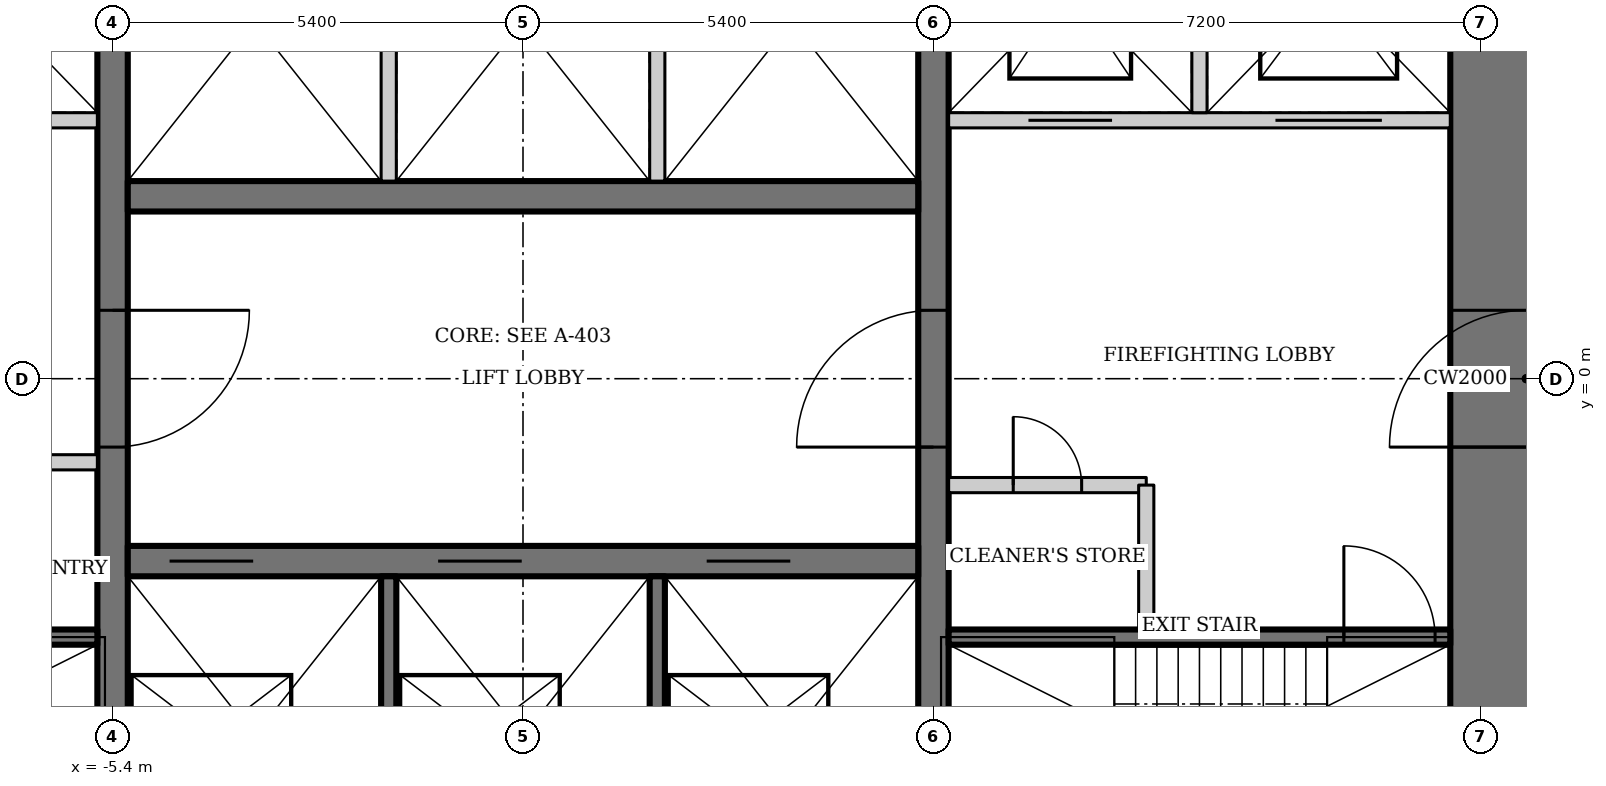
"""IFC4 building model, lengths in metres.
Left out: names, types, materials, properties, quantities, classifications, styles, units other than length and angle.
Written with IfcOpenShell. Run it as: python <this file> out.ifc"""

import sys

from ifc_helpers import new_model, si_unit, direction, frame, frame_2d, origin, place, context, subcontext, project, spatial, rectangle, extrude, element, fill, save


model = new_model("IFC4")
c1 = context("Model", 3, precision=1e-05, world=origin(), true_north=direction((0.0, 1.0)))
c2 = subcontext(c1, "Body", "Model", "MODEL_VIEW")
j1 = project(units=[si_unit("LENGTHUNIT", "METRE"), si_unit("PLANEANGLEUNIT", "RADIAN")], contexts=[c1])
p1 = place(None, origin())
s1 = spatial("IfcSite", under=j1, at=p1, CompositionType="ELEMENT")
p2 = place(p1, origin())
s2 = spatial("IfcBuilding", under=s1, at=p2, CompositionType="ELEMENT")
p3 = place(p2, frame((0.0, 0.0, 83.8)))
s3 = spatial("IfcBuildingStorey", under=s2, at=p3, CompositionType="ELEMENT", Elevation=83.8)
p4 = place(p3, frame((13.2, -13.0, 0.0), z_axis=(0.0, 0.0, 1.0), x_axis=(0.0, 1.0, 0.0)))
e1 = element("IfcWall", 1, at=p4, inside=s3, PredefinedType="SHEAR", context=c2, shape_type="SweptSolid", body=[
    extrude(rectangle(XDim=26.0, YDim=2.0, at=frame_2d((13.0, 0.0))), origin(), (0.0, 0.0, 1.0), 3.6),
])
p5 = place(p4, frame((12.1, 0.0, 0.0)))
e2 = element("IfcOpeningElement", 2, at=p5, cuts=e1, PredefinedType="OPENING", context=c2, shape_type="SweptSolid", body=[
    extrude(rectangle(XDim=1.8, YDim=2.1, at=frame_2d((0.9, 1.05))), frame((0.0, 1.01, 0.0), z_axis=(0.0, -1.0, 0.0), x_axis=(1.0, 0.0, 0.0)), (0.0, 0.0, 1.0), 2.02),
])
p6 = place(p3, frame((5.4, -6.8, 0.0), z_axis=(0.0, 0.0, 1.0), x_axis=(0.0, 1.0, 0.0)))
e3 = element("IfcWall", 3, at=p6, inside=s3, PredefinedType="SHEAR", context=c2, shape_type="SweptSolid", body=[
    extrude(rectangle(XDim=13.6, YDim=0.4, at=frame_2d((6.8, 0.0))), origin(), (0.0, 0.0, 1.0), 3.6),
])
p7 = place(p6, frame((5.9, 0.0, 0.0)))
e4 = element("IfcOpeningElement", 4, at=p7, cuts=e3, PredefinedType="OPENING", context=c2, shape_type="SweptSolid", body=[
    extrude(rectangle(XDim=1.8, YDim=2.1, at=frame_2d((0.9, 1.05))), frame((0.0, 0.21, 0.0), z_axis=(0.0, -1.0, 0.0), x_axis=(1.0, 0.0, 0.0)), (0.0, 0.0, 1.0), 0.42),
])
p8 = place(p3, frame((-5.4, 6.8, 0.0), z_axis=(0.0, 0.0, 1.0), x_axis=(0.0, -1.0, 0.0)))
e5 = element("IfcWall", 5, at=p8, inside=s3, PredefinedType="SHEAR", context=c2, shape_type="SweptSolid", body=[
    extrude(rectangle(XDim=13.6, YDim=0.4, at=frame_2d((6.8, 0.0))), origin(), (0.0, 0.0, 1.0), 3.6),
])
p9 = place(p8, frame((5.9, 0.0, 0.0)))
e6 = element("IfcOpeningElement", 6, at=p9, cuts=e5, PredefinedType="OPENING", context=c2, shape_type="SweptSolid", body=[
    extrude(rectangle(XDim=1.8, YDim=2.1, at=frame_2d((0.9, 1.05))), frame((0.0, 0.21, 0.0), z_axis=(0.0, -1.0, 0.0), x_axis=(1.0, 0.0, 0.0)), (0.0, 0.0, 1.0), 0.42),
])
p10 = place(p3, frame((-5.2, -2.4, 0.0), z_axis=(0.0, 0.0, 1.0), x_axis=(1.0, 0.0, 0.0)))
e7 = element("IfcWall", 7, at=p10, inside=s3, PredefinedType="SHEAR", context=c2, shape_type="SweptSolid", body=[
    extrude(rectangle(XDim=10.4, YDim=0.4, at=frame_2d((5.2, 0.0))), origin(), (0.0, 0.0, 1.0), 3.6),
])
p11 = place(p10, frame((0.55, 0.0, 0.0)))
e8 = element("IfcOpeningElement", 8, at=p11, cuts=e7, PredefinedType="OPENING", context=c2, shape_type="SweptSolid", body=[
    extrude(rectangle(XDim=1.1, YDim=2.2, at=frame_2d((0.55, 1.1))), frame((0.0, 0.21, 0.0), z_axis=(0.0, -1.0, 0.0), x_axis=(1.0, 0.0, 0.0)), (0.0, 0.0, 1.0), 0.42),
])
p12 = place(p10, frame((4.083, 0.0, 0.0)))
e9 = element("IfcOpeningElement", 9, at=p12, cuts=e7, PredefinedType="OPENING", context=c2, shape_type="SweptSolid", body=[
    extrude(rectangle(XDim=1.1, YDim=2.2, at=frame_2d((0.55, 1.1))), frame((0.0, 0.21, 0.0), z_axis=(0.0, -1.0, 0.0), x_axis=(1.0, 0.0, 0.0)), (0.0, 0.0, 1.0), 0.42),
])
p13 = place(p10, frame((7.617, 0.0, 0.0)))
e10 = element("IfcOpeningElement", 10, at=p13, cuts=e7, PredefinedType="OPENING", context=c2, shape_type="SweptSolid", body=[
    extrude(rectangle(XDim=1.1, YDim=2.2, at=frame_2d((0.55, 1.1))), frame((0.0, 0.21, 0.0), z_axis=(0.0, -1.0, 0.0), x_axis=(1.0, 0.0, 0.0)), (0.0, 0.0, 1.0), 0.42),
])
for number, where, z_axis, x_axis in (
    (11, (-1.767, -2.6, 0.0), (0.0, 0.0, 1.0), (0.0, -1.0, 0.0)),
    (12, (1.767, -2.6, 0.0), (0.0, 0.0, 1.0), (0.0, -1.0, 0.0)),
):
    element("IfcWall", number, at=place(p3, frame(where, z_axis=z_axis, x_axis=x_axis)), inside=s3, PredefinedType="SOLIDWALL", context=c2, shape_type="SweptSolid", body=[
        extrude(rectangle(XDim=4.2, YDim=0.2, at=frame_2d((2.1, 0.0))), origin(), (0.0, 0.0, 1.0), 3.6),
    ])
p14 = place(p3, frame((5.2, 2.4, 0.0), z_axis=(0.0, 0.0, 1.0), x_axis=(-1.0, 0.0, 0.0)))
e13 = element("IfcWall", 13, at=p14, inside=s3, PredefinedType="SHEAR", context=c2, shape_type="SweptSolid", body=[
    extrude(rectangle(XDim=10.4, YDim=0.4, at=frame_2d((5.2, 0.0))), origin(), (0.0, 0.0, 1.0), 3.6),
])
for number, where, z_axis, x_axis in (
    (14, (-1.767, 2.6, 0.0), (0.0, 0.0, 1.0), (0.0, 1.0, 0.0)),
    (15, (1.767, 2.6, 0.0), (0.0, 0.0, 1.0), (0.0, 1.0, 0.0)),
):
    element("IfcWall", number, at=place(p3, frame(where, z_axis=z_axis, x_axis=x_axis)), inside=s3, PredefinedType="SOLIDWALL", context=c2, shape_type="SweptSolid", body=[
        extrude(rectangle(XDim=4.2, YDim=0.2, at=frame_2d((2.1, 0.0))), origin(), (0.0, 0.0, 1.0), 3.6),
    ])
p15 = place(p3, frame((5.6, -3.4, 0.0), z_axis=(0.0, 0.0, 1.0), x_axis=(1.0, 0.0, 0.0)))
e16 = element("IfcWall", 16, at=p15, inside=s3, PredefinedType="SHEAR", context=c2, shape_type="SweptSolid", body=[
    extrude(rectangle(XDim=6.6, YDim=0.2, at=frame_2d((3.3, 0.0))), origin(), (0.0, 0.0, 1.0), 3.6),
])
p16 = place(p15, frame((5.2, 0.0, 0.0)))
e17 = element("IfcOpeningElement", 17, at=p16, cuts=e16, PredefinedType="OPENING", context=c2, shape_type="SweptSolid", body=[
    extrude(rectangle(XDim=1.2, YDim=2.1, at=frame_2d((0.6, 1.05))), frame((0.0, 0.11, 0.0), z_axis=(0.0, -1.0, 0.0), x_axis=(1.0, 0.0, 0.0)), (0.0, 0.0, 1.0), 0.22),
])
p17 = place(p3, frame((12.2, 3.4, 0.0), z_axis=(0.0, 0.0, 1.0), x_axis=(-1.0, 0.0, 0.0)))
e18 = element("IfcWall", 18, at=p17, inside=s3, PredefinedType="SOLIDWALL", context=c2, shape_type="SweptSolid", body=[
    extrude(rectangle(XDim=6.6, YDim=0.2, at=frame_2d((3.3, 0.0))), origin(), (0.0, 0.0, 1.0), 3.6),
])
p18 = place(p17, frame((4.45, 0.0, 0.0)))
e19 = element("IfcOpeningElement", 19, at=p18, cuts=e18, PredefinedType="OPENING", context=c2, shape_type="SweptSolid", body=[
    extrude(rectangle(XDim=1.1, YDim=2.2, at=frame_2d((0.55, 1.1))), frame((0.0, 0.11, 0.0), z_axis=(0.0, -1.0, 0.0), x_axis=(1.0, 0.0, 0.0)), (0.0, 0.0, 1.0), 0.22),
])
p19 = place(p17, frame((0.9, 0.0, 0.0)))
e20 = element("IfcOpeningElement", 20, at=p19, cuts=e18, PredefinedType="OPENING", context=c2, shape_type="SweptSolid", body=[
    extrude(rectangle(XDim=1.4, YDim=2.2, at=frame_2d((0.7, 1.1))), frame((0.0, 0.11, 0.0), z_axis=(0.0, -1.0, 0.0), x_axis=(1.0, 0.0, 0.0)), (0.0, 0.0, 1.0), 0.22),
])
p20 = place(p3, frame((8.9, 3.5, 0.0), z_axis=(0.0, 0.0, 1.0), x_axis=(0.0, 1.0, 0.0)))
e21 = element("IfcWall", 21, at=p20, inside=s3, PredefinedType="SOLIDWALL", context=c2, shape_type="SweptSolid", body=[
    extrude(rectangle(XDim=3.3, YDim=0.2, at=frame_2d((1.65, 0.0))), origin(), (0.0, 0.0, 1.0), 3.6),
])
p21 = place(p3, frame((-5.6, -3.4, 0.0), z_axis=(0.0, 0.0, 1.0), x_axis=(-1.0, 0.0, 0.0)))
e22 = element("IfcWall", 22, at=p21, inside=s3, PredefinedType="SHEAR", context=c2, shape_type="SweptSolid", body=[
    extrude(rectangle(XDim=6.6, YDim=0.2, at=frame_2d((3.3, 0.0))), origin(), (0.0, 0.0, 1.0), 3.6),
])
p22 = place(p21, frame((5.2, 0.0, 0.0)))
e23 = element("IfcOpeningElement", 23, at=p22, cuts=e22, PredefinedType="OPENING", context=c2, shape_type="SweptSolid", body=[
    extrude(rectangle(XDim=1.2, YDim=2.1, at=frame_2d((0.6, 1.05))), frame((0.0, 0.11, 0.0), z_axis=(0.0, -1.0, 0.0), x_axis=(1.0, 0.0, 0.0)), (0.0, 0.0, 1.0), 0.22),
])
p23 = place(p3, frame((-12.2, 3.4, 0.0), z_axis=(0.0, 0.0, 1.0), x_axis=(1.0, 0.0, 0.0)))
e24 = element("IfcWall", 24, at=p23, inside=s3, PredefinedType="SOLIDWALL", context=c2, shape_type="SweptSolid", body=[
    extrude(rectangle(XDim=6.6, YDim=0.2, at=frame_2d((3.3, 0.0))), origin(), (0.0, 0.0, 1.0), 3.6),
])
p24 = place(p23, frame((1.05, 0.0, 0.0)))
e25 = element("IfcOpeningElement", 25, at=p24, cuts=e24, PredefinedType="OPENING", context=c2, shape_type="SweptSolid", body=[
    extrude(rectangle(XDim=1.1, YDim=2.2, at=frame_2d((0.55, 1.1))), frame((0.0, 0.11, 0.0), z_axis=(0.0, -1.0, 0.0), x_axis=(1.0, 0.0, 0.0)), (0.0, 0.0, 1.0), 0.22),
])
p25 = place(p23, frame((4.3, 0.0, 0.0)))
e26 = element("IfcOpeningElement", 26, at=p25, cuts=e24, PredefinedType="OPENING", context=c2, shape_type="SweptSolid", body=[
    extrude(rectangle(XDim=1.4, YDim=2.2, at=frame_2d((0.7, 1.1))), frame((0.0, 0.11, 0.0), z_axis=(0.0, -1.0, 0.0), x_axis=(1.0, 0.0, 0.0)), (0.0, 0.0, 1.0), 0.22),
])
p26 = place(p3, frame((-5.6, -1.1, 0.0), z_axis=(0.0, 0.0, 1.0), x_axis=(-1.0, 0.0, 0.0)))
e27 = element("IfcWall", 27, at=p26, inside=s3, PredefinedType="SOLIDWALL", context=c2, shape_type="SweptSolid", body=[
    extrude(rectangle(XDim=2.4, YDim=0.2, at=frame_2d((1.2, 0.0))), origin(), (0.0, 0.0, 1.0), 3.45),
])
p27 = place(p26, frame((0.75, 0.0, 0.0)))
e28 = element("IfcOpeningElement", 28, at=p27, cuts=e27, PredefinedType="OPENING", context=c2, shape_type="SweptSolid", body=[
    extrude(rectangle(XDim=0.9, YDim=2.1, at=frame_2d((0.45, 1.05))), frame((0.0, 0.11, 0.0), z_axis=(0.0, -1.0, 0.0), x_axis=(1.0, 0.0, 0.0)), (0.0, 0.0, 1.0), 0.22),
])
p28 = place(p3, frame((5.6, -1.4, 0.0), z_axis=(0.0, 0.0, 1.0), x_axis=(1.0, 0.0, 0.0)))
e29 = element("IfcWall", 29, at=p28, inside=s3, PredefinedType="SOLIDWALL", context=c2, shape_type="SweptSolid", body=[
    extrude(rectangle(XDim=2.6, YDim=0.2, at=frame_2d((1.3, 0.0))), origin(), (0.0, 0.0, 1.0), 3.45),
])
p29 = place(p28, frame((0.85, 0.0, 0.0)))
e30 = element("IfcOpeningElement", 30, at=p29, cuts=e29, PredefinedType="OPENING", context=c2, shape_type="SweptSolid", body=[
    extrude(rectangle(XDim=0.9, YDim=2.1, at=frame_2d((0.45, 1.05))), frame((0.0, 0.11, 0.0), z_axis=(0.0, -1.0, 0.0), x_axis=(1.0, 0.0, 0.0)), (0.0, 0.0, 1.0), 0.22),
])
p30 = place(p3, frame((8.2, -1.4, 0.0), z_axis=(0.0, 0.0, 1.0), x_axis=(0.0, -1.0, 0.0)))
e31 = element("IfcWall", 31, at=p30, inside=s3, PredefinedType="SOLIDWALL", context=c2, shape_type="SweptSolid", body=[
    extrude(rectangle(XDim=1.9, YDim=0.2, at=frame_2d((0.95, 0.0))), origin(), (0.0, 0.0, 1.0), 3.45),
])
p31 = place(p29, origin())
e32 = element("IfcDoor", 32, at=p31, inside=s3, OperationType="SINGLE_SWING_LEFT", PredefinedType="DOOR", context=c2, shape_type="SweptSolid", body=[
    extrude(rectangle(XDim=0.9, YDim=2.1, at=frame_2d((0.45, 1.05))), frame((0.0, 0.025, 0.0), z_axis=(0.0, -1.0, 0.0), x_axis=(1.0, 0.0, 0.0)), (0.0, 0.0, 1.0), 0.05),
])
fill(e30, e32)
p32 = place(p7, origin())
e33 = element("IfcDoor", 33, at=p32, inside=s3, OperationType="DOUBLE_DOOR_DOUBLE_SWING", PredefinedType="DOOR", context=c2, shape_type="SweptSolid", body=[
    extrude(rectangle(XDim=1.8, YDim=2.1, at=frame_2d((0.9, 1.05))), frame((0.0, 0.025, 0.0), z_axis=(0.0, -1.0, 0.0), x_axis=(1.0, 0.0, 0.0)), (0.0, 0.0, 1.0), 0.05),
])
fill(e4, e33)
p33 = place(p9, origin())
e34 = element("IfcDoor", 34, at=p33, inside=s3, OperationType="DOUBLE_DOOR_DOUBLE_SWING", PredefinedType="DOOR", context=c2, shape_type="SweptSolid", body=[
    extrude(rectangle(XDim=1.8, YDim=2.1, at=frame_2d((0.9, 1.05))), frame((0.0, 0.025, 0.0), z_axis=(0.0, -1.0, 0.0), x_axis=(1.0, 0.0, 0.0)), (0.0, 0.0, 1.0), 0.05),
])
fill(e6, e34)
p34 = place(p16, origin())
e35 = element("IfcDoor", 35, at=p34, inside=s3, OperationType="SINGLE_SWING_RIGHT", PredefinedType="DOOR", context=c2, shape_type="SweptSolid", body=[
    extrude(rectangle(XDim=1.2, YDim=2.1, at=frame_2d((0.6, 1.05))), frame((0.0, 0.025, 0.0), z_axis=(0.0, -1.0, 0.0), x_axis=(1.0, 0.0, 0.0)), (0.0, 0.0, 1.0), 0.05),
])
fill(e17, e35)
p35 = place(p5, origin())
e36 = element("IfcDoor", 36, at=p35, inside=s3, OperationType="DOUBLE_DOOR_DOUBLE_SWING", PredefinedType="DOOR", context=c2, shape_type="SweptSolid", body=[
    extrude(rectangle(XDim=1.8, YDim=2.1, at=frame_2d((0.9, 1.05))), frame((0.0, 0.025, 0.0), z_axis=(0.0, -1.0, 0.0), x_axis=(1.0, 0.0, 0.0)), (0.0, 0.0, 1.0), 0.05),
])
fill(e2, e36)
p36 = place(p11, origin())
e37 = element("IfcDoor", 37, at=p36, inside=s3, OperationType="DOUBLE_DOOR_SLIDING", PredefinedType="DOOR", context=c2, shape_type="SweptSolid", body=[
    extrude(rectangle(XDim=1.1, YDim=2.2, at=frame_2d((0.55, 1.1))), frame((0.0, 0.025, 0.0), z_axis=(0.0, -1.0, 0.0), x_axis=(1.0, 0.0, 0.0)), (0.0, 0.0, 1.0), 0.05),
])
fill(e8, e37)
p37 = place(p12, origin())
e38 = element("IfcDoor", 38, at=p37, inside=s3, OperationType="DOUBLE_DOOR_SLIDING", PredefinedType="DOOR", context=c2, shape_type="SweptSolid", body=[
    extrude(rectangle(XDim=1.1, YDim=2.2, at=frame_2d((0.55, 1.1))), frame((0.0, 0.025, 0.0), z_axis=(0.0, -1.0, 0.0), x_axis=(1.0, 0.0, 0.0)), (0.0, 0.0, 1.0), 0.05),
])
fill(e9, e38)
p38 = place(p13, origin())
e39 = element("IfcDoor", 39, at=p38, inside=s3, OperationType="DOUBLE_DOOR_SLIDING", PredefinedType="DOOR", context=c2, shape_type="SweptSolid", body=[
    extrude(rectangle(XDim=1.1, YDim=2.2, at=frame_2d((0.55, 1.1))), frame((0.0, 0.025, 0.0), z_axis=(0.0, -1.0, 0.0), x_axis=(1.0, 0.0, 0.0)), (0.0, 0.0, 1.0), 0.05),
])
fill(e10, e39)
p39 = place(p18, origin())
e40 = element("IfcDoor", 40, at=p39, inside=s3, OperationType="DOUBLE_DOOR_SLIDING", PredefinedType="DOOR", context=c2, shape_type="SweptSolid", body=[
    extrude(rectangle(XDim=1.1, YDim=2.2, at=frame_2d((0.55, 1.1))), frame((0.0, 0.025, 0.0), z_axis=(0.0, -1.0, 0.0), x_axis=(1.0, 0.0, 0.0)), (0.0, 0.0, 1.0), 0.05),
])
fill(e19, e40)
p40 = place(p19, origin())
e41 = element("IfcDoor", 41, at=p40, inside=s3, OperationType="DOUBLE_DOOR_SLIDING", PredefinedType="DOOR", context=c2, shape_type="SweptSolid", body=[
    extrude(rectangle(XDim=1.4, YDim=2.2, at=frame_2d((0.7, 1.1))), frame((0.0, 0.025, 0.0), z_axis=(0.0, -1.0, 0.0), x_axis=(1.0, 0.0, 0.0)), (0.0, 0.0, 1.0), 0.05),
])
fill(e20, e41)
save(model, sys.argv[1])
